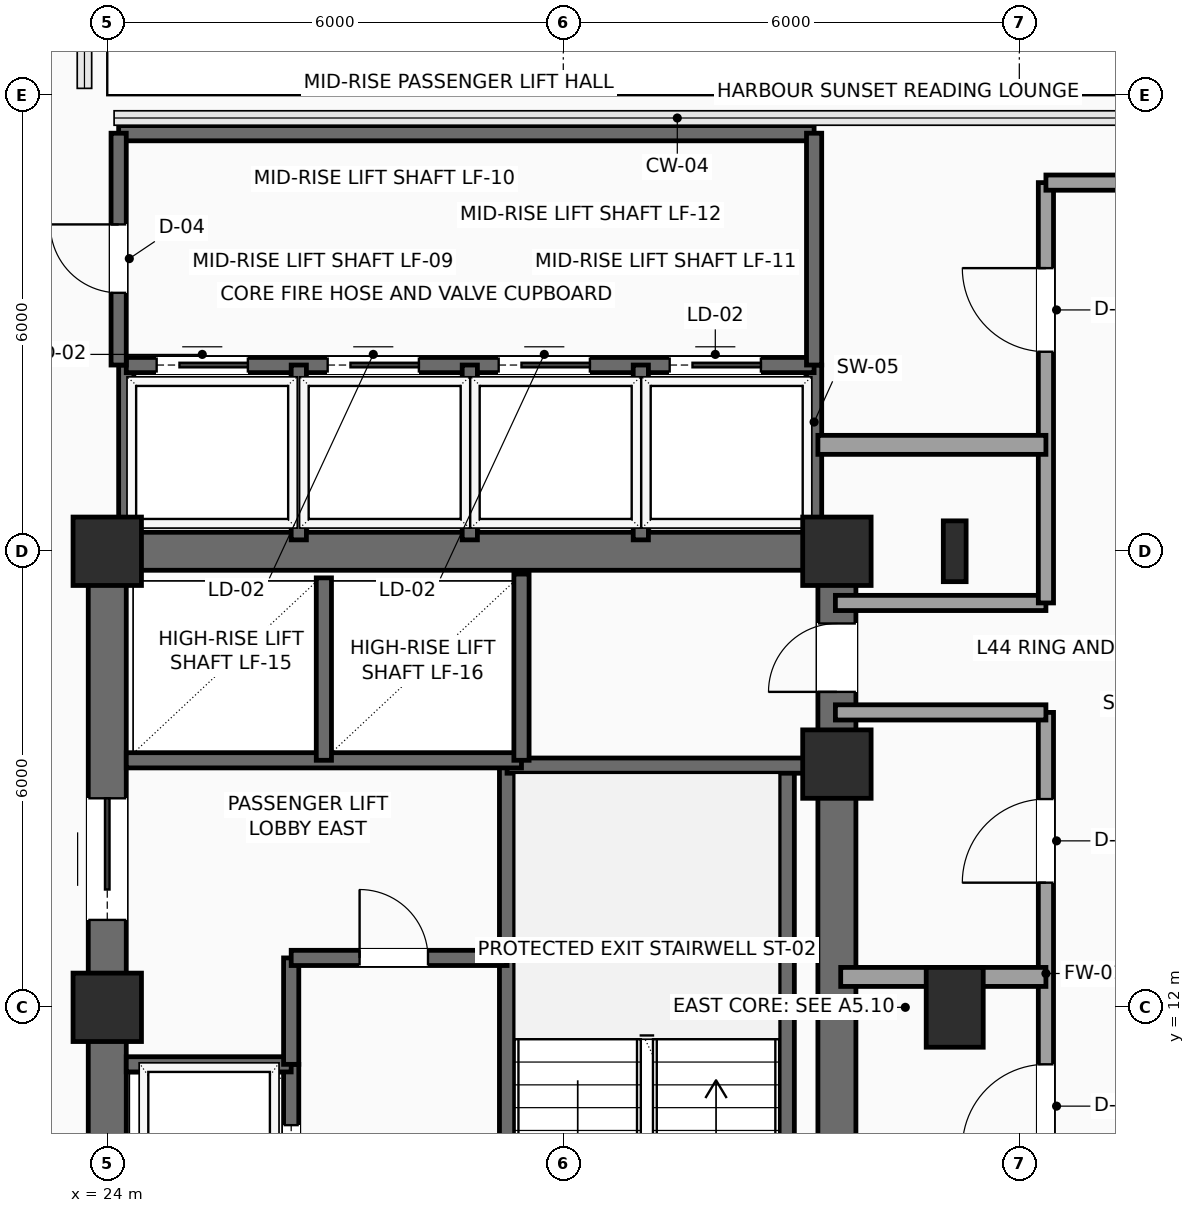
"""IFC4 building model, lengths in metres.
Left out: names, types, materials, properties, quantities, classifications, styles, units other than length and angle.
Written with IfcOpenShell. Run it as: python <this file> out.ifc"""

import sys

from ifc_helpers import new_model, si_unit, direction, frame, frame_2d, origin, origin_2d, place, context, subcontext, project, spatial, rectangle, i_section, extrude, element, fill, save


model = new_model("IFC4")
c1 = context("Model", 3, precision=1e-05, world=origin(), true_north=direction((0.0, 1.0)))
c2 = subcontext(c1, "Body", "Model", "MODEL_VIEW")
j1 = project(units=[si_unit("LENGTHUNIT", "METRE"), si_unit("PLANEANGLEUNIT", "RADIAN")], contexts=[c1])
p1 = place(None, origin())
s1 = spatial("IfcSite", under=j1, at=p1, CompositionType="ELEMENT")
p2 = place(p1, origin())
s2 = spatial("IfcBuilding", under=s1, at=p2, CompositionType="ELEMENT")
p3 = place(p2, frame((0.0, 0.0, 180.45)))
s3 = spatial("IfcBuildingStorey", under=s2, at=p3, CompositionType="ELEMENT", Elevation=180.45)
for number, where, z_axis, x_axis in (
    (1, (24.0, 12.0, 0.0), (0.0, 0.0, 1.0), (1.0, 0.0, 0.0)),
    (2, (24.0, 18.0, 0.0), (0.0, 0.0, 1.0), (1.0, 0.0, 0.0)),
    (3, (33.6, 15.2, 0.0), (0.0, 0.0, 1.0), (1.0, 0.0, 0.0)),
    (4, (33.6, 18.0, 0.0), (0.0, 0.0, 1.0), (1.0, 0.0, 0.0)),
):
    element("IfcColumn", number, at=place(p3, frame(where, z_axis=z_axis, x_axis=x_axis)), inside=s3, PredefinedType="COLUMN", context=c2, shape_type="SweptSolid", body=[
        extrude(rectangle(XDim=0.9, YDim=0.9, at=origin_2d()), origin(), (0.0, 0.0, 1.0), 3.75),
    ])
p4 = place(p3, frame((35.15, 12.0, 0.0), z_axis=(0.0, 0.0, 1.0), x_axis=(1.0, 0.0, 0.0)))
e5 = element("IfcColumn", 5, at=p4, inside=s3, PredefinedType="COLUMN", context=c2, shape_type="SweptSolid", body=[
    extrude(rectangle(XDim=0.75, YDim=1.05, at=origin_2d()), origin(), (0.0, 0.0, 1.0), 3.75),
])
p5 = place(p3, frame((35.15, 18.0, 0.0), z_axis=(0.0, 0.0, 1.0), x_axis=(1.0, 0.0, 0.0)))
e6 = element("IfcColumn", 6, at=p5, inside=s3, PredefinedType="COLUMN", context=c2, shape_type="SweptSolid", body=[
    extrude(i_section(OverallWidth=0.3, OverallDepth=0.8, WebThickness=0.018, FlangeThickness=0.033, FilletRadius=0.03, at=origin_2d()), origin(), (0.0, 0.0, 1.0), 3.75),
])
p6 = place(p3, frame((24.0, 18.0, 0.0), z_axis=(0.0, 0.0, 1.0), x_axis=(1.0, 0.0, 0.0)))
e7 = element("IfcWall", 7, at=p6, inside=s3, PredefinedType="SHEAR", context=c2, shape_type="SweptSolid", body=[
    extrude(rectangle(XDim=9.6, YDim=0.5, at=frame_2d((4.8, 0.0))), origin(), (0.0, 0.0, 1.0), 3.54),
])
p7 = place(p3, frame((24.0, 6.0, 0.0), z_axis=(0.0, 0.0, 1.0), x_axis=(0.0, 1.0, 0.0)))
e8 = element("IfcWall", 8, at=p7, inside=s3, PredefinedType="SHEAR", context=c2, shape_type="SweptSolid", body=[
    extrude(rectangle(XDim=12.0, YDim=0.5, at=frame_2d((6.0, 0.0))), origin(), (0.0, 0.0, 1.0), 3.54),
])
p8 = place(p7, frame((7.15, 0.0, 0.0)))
e9 = element("IfcOpeningElement", 9, at=p8, cuts=e8, PredefinedType="OPENING", context=c2, shape_type="SweptSolid", body=[
    extrude(rectangle(XDim=1.6, YDim=2.3, at=frame_2d((0.8, 1.15))), frame((0.0, 0.26, 0.0), z_axis=(0.0, -1.0, 0.0), x_axis=(1.0, 0.0, 0.0)), (0.0, 0.0, 1.0), 0.52),
])
p9 = place(p3, frame((33.6, 6.0, 0.0), z_axis=(0.0, 0.0, 1.0), x_axis=(0.0, 1.0, 0.0)))
e10 = element("IfcWall", 10, at=p9, inside=s3, PredefinedType="SHEAR", context=c2, shape_type="SweptSolid", body=[
    extrude(rectangle(XDim=12.0, YDim=0.5, at=frame_2d((6.0, 0.0))), origin(), (0.0, 0.0, 1.0), 3.54),
])
p10 = place(p9, frame((10.15, 0.0, 0.0)))
e11 = element("IfcOpeningElement", 11, at=p10, cuts=e10, PredefinedType="OPENING", context=c2, shape_type="SweptSolid", body=[
    extrude(rectangle(XDim=0.9, YDim=2.15, at=frame_2d((0.45, 1.075))), frame((0.0, 0.26, 0.0), z_axis=(0.0, -1.0, 0.0), x_axis=(1.0, 0.0, 0.0)), (0.0, 0.0, 1.0), 0.52),
])
p11 = place(p3, frame((29.26, 6.3, 0.0), z_axis=(0.0, 0.0, 1.0), x_axis=(0.0, 1.0, 0.0)))
e12 = element("IfcWall", 12, at=p11, inside=s3, PredefinedType="SHEAR", context=c2, shape_type="SweptSolid", body=[
    extrude(rectangle(XDim=8.88, YDim=0.2, at=frame_2d((4.44, 0.0))), origin(), (0.0, 0.0, 1.0), 3.54),
])
p12 = place(p11, frame((0.35, 0.0, 0.0)))
e13 = element("IfcOpeningElement", 13, at=p12, cuts=e12, PredefinedType="OPENING", context=c2, shape_type="SweptSolid", body=[
    extrude(rectangle(XDim=1.1, YDim=2.2, at=frame_2d((0.55, 1.1))), frame((0.0, 0.11, 0.0), z_axis=(0.0, -1.0, 0.0), x_axis=(1.0, 0.0, 0.0)), (0.0, 0.0, 1.0), 0.22),
])
p13 = place(p3, frame((32.94, 6.3, 0.0), z_axis=(0.0, 0.0, 1.0), x_axis=(0.0, 1.0, 0.0)))
e14 = element("IfcWall", 14, at=p13, inside=s3, PredefinedType="SHEAR", context=c2, shape_type="SweptSolid", body=[
    extrude(rectangle(XDim=8.88, YDim=0.2, at=frame_2d((4.44, 0.0))), origin(), (0.0, 0.0, 1.0), 3.54),
])
p14 = place(p3, frame((29.26, 15.18, 0.0), z_axis=(0.0, 0.0, 1.0), x_axis=(1.0, 0.0, 0.0)))
e15 = element("IfcWall", 15, at=p14, inside=s3, PredefinedType="SHEAR", context=c2, shape_type="SweptSolid", body=[
    extrude(rectangle(XDim=4.04, YDim=0.2, at=frame_2d((2.02, 0.0))), origin(), (0.0, 0.0, 1.0), 3.54),
])
p15 = place(p3, frame((26.42, 6.3, 0.0), z_axis=(0.0, 0.0, 1.0), x_axis=(0.0, 1.0, 0.0)))
e16 = element("IfcWall", 16, at=p15, inside=s3, PredefinedType="SHEAR", context=c2, shape_type="SweptSolid", body=[
    extrude(rectangle(XDim=4.95, YDim=0.2, at=frame_2d((2.475, 0.0))), origin(), (0.0, 0.0, 1.0), 3.54),
])
p16 = place(p15, frame((0.65, 0.0, 0.0)))
e17 = element("IfcOpeningElement", 17, at=p16, cuts=e16, PredefinedType="OPENING", context=c2, shape_type="SweptSolid", body=[
    extrude(rectangle(XDim=1.1, YDim=2.2, at=frame_2d((0.55, 1.1))), frame((0.0, 0.11, 0.0), z_axis=(0.0, -1.0, 0.0), x_axis=(1.0, 0.0, 0.0)), (0.0, 0.0, 1.0), 0.22),
])
p17 = place(p15, frame((3.05, 0.0, 0.0)))
e18 = element("IfcOpeningElement", 18, at=p17, cuts=e16, PredefinedType="OPENING", context=c2, shape_type="SweptSolid", body=[
    extrude(rectangle(XDim=1.1, YDim=2.2, at=frame_2d((0.55, 1.1))), frame((0.0, 0.11, 0.0), z_axis=(0.0, -1.0, 0.0), x_axis=(1.0, 0.0, 0.0)), (0.0, 0.0, 1.0), 0.22),
])
p18 = place(p3, frame((24.25, 11.25, 0.0), z_axis=(0.0, 0.0, 1.0), x_axis=(1.0, 0.0, 0.0)))
e19 = element("IfcWall", 19, at=p18, inside=s3, PredefinedType="SHEAR", context=c2, shape_type="SweptSolid", body=[
    extrude(rectangle(XDim=2.17, YDim=0.2, at=frame_2d((1.085, 0.0))), origin(), (0.0, 0.0, 1.0), 3.54),
])
p19 = place(p3, frame((26.42, 11.25, 0.0), z_axis=(0.0, 0.0, 1.0), x_axis=(0.0, 1.0, 0.0)))
e20 = element("IfcWall", 20, at=p19, inside=s3, PredefinedType="SHEAR", context=c2, shape_type="SweptSolid", body=[
    extrude(rectangle(XDim=1.4, YDim=0.2, at=frame_2d((0.7, 0.0))), origin(), (0.0, 0.0, 1.0), 3.54),
])
p20 = place(p3, frame((26.42, 12.65, 0.0), z_axis=(0.0, 0.0, 1.0), x_axis=(1.0, 0.0, 0.0)))
e21 = element("IfcWall", 21, at=p20, inside=s3, PredefinedType="SHEAR", context=c2, shape_type="SweptSolid", body=[
    extrude(rectangle(XDim=2.84, YDim=0.2, at=frame_2d((1.42, 0.0))), origin(), (0.0, 0.0, 1.0), 3.54),
])
p21 = place(p20, frame((0.9, 0.0, 0.0)))
e22 = element("IfcOpeningElement", 22, at=p21, cuts=e21, PredefinedType="OPENING", context=c2, shape_type="SweptSolid", body=[
    extrude(rectangle(XDim=0.9, YDim=2.15, at=frame_2d((0.45, 1.075))), frame((0.0, 0.11, 0.0), z_axis=(0.0, -1.0, 0.0), x_axis=(1.0, 0.0, 0.0)), (0.0, 0.0, 1.0), 0.22),
])
p22 = place(p3, frame((24.25, 15.25, 0.0), z_axis=(0.0, 0.0, 1.0), x_axis=(1.0, 0.0, 0.0)))
e23 = element("IfcWall", 23, at=p22, inside=s3, PredefinedType="SHEAR", context=c2, shape_type="SweptSolid", body=[
    extrude(rectangle(XDim=5.2, YDim=0.2, at=frame_2d((2.6, 0.0))), origin(), (0.0, 0.0, 1.0), 3.54),
])
p23 = place(p3, frame((26.85, 15.25, 0.0), z_axis=(0.0, 0.0, 1.0), x_axis=(0.0, 1.0, 0.0)))
e24 = element("IfcWall", 24, at=p23, inside=s3, PredefinedType="SHEAR", context=c2, shape_type="SweptSolid", body=[
    extrude(rectangle(XDim=2.4, YDim=0.2, at=frame_2d((1.2, 0.0))), origin(), (0.0, 0.0, 1.0), 3.54),
])
p24 = place(p3, frame((29.45, 15.25, 0.0), z_axis=(0.0, 0.0, 1.0), x_axis=(0.0, 1.0, 0.0)))
e25 = element("IfcWall", 25, at=p24, inside=s3, PredefinedType="SHEAR", context=c2, shape_type="SweptSolid", body=[
    extrude(rectangle(XDim=2.45, YDim=0.2, at=frame_2d((1.225, 0.0))), origin(), (0.0, 0.0, 1.0), 3.54),
])
for number, where, z_axis, x_axis in (
    (26, (33.3, 18.1, 0.0), (0.0, 0.0, 1.0), (0.0, 1.0, 0.0)),
    (27, (24.25, 18.1, 0.0), (0.0, 0.0, 1.0), (0.0, 1.0, 0.0)),
):
    element("IfcWall", number, at=place(p3, frame(where, z_axis=z_axis, x_axis=x_axis)), inside=s3, PredefinedType="SHEAR", context=c2, shape_type="SweptSolid", body=[
        extrude(rectangle(XDim=2.35, YDim=0.2, at=frame_2d((1.175, 0.0))), origin(), (0.0, 0.0, 1.0), 3.54),
    ])
p25 = place(p3, frame((24.25, 20.45, 0.0), z_axis=(0.0, 0.0, 1.0), x_axis=(1.0, 0.0, 0.0)))
e28 = element("IfcWall", 28, at=p25, inside=s3, PredefinedType="SHEAR", context=c2, shape_type="SweptSolid", body=[
    extrude(rectangle(XDim=9.05, YDim=0.2, at=frame_2d((4.525, 0.0))), origin(), (0.0, 0.0, 1.0), 3.54),
])
p26 = place(p25, frame((0.4, 0.0, 0.0)))
e29 = element("IfcOpeningElement", 29, at=p26, cuts=e28, PredefinedType="OPENING", context=c2, shape_type="SweptSolid", body=[
    extrude(rectangle(XDim=1.2, YDim=2.2, at=frame_2d((0.6, 1.1))), frame((0.0, 0.11, 0.0), z_axis=(0.0, -1.0, 0.0), x_axis=(1.0, 0.0, 0.0)), (0.0, 0.0, 1.0), 0.22),
])
p27 = place(p25, frame((2.65, 0.0, 0.0)))
e30 = element("IfcOpeningElement", 30, at=p27, cuts=e28, PredefinedType="OPENING", context=c2, shape_type="SweptSolid", body=[
    extrude(rectangle(XDim=1.2, YDim=2.2, at=frame_2d((0.6, 1.1))), frame((0.0, 0.11, 0.0), z_axis=(0.0, -1.0, 0.0), x_axis=(1.0, 0.0, 0.0)), (0.0, 0.0, 1.0), 0.22),
])
p28 = place(p25, frame((4.9, 0.0, 0.0)))
e31 = element("IfcOpeningElement", 31, at=p28, cuts=e28, PredefinedType="OPENING", context=c2, shape_type="SweptSolid", body=[
    extrude(rectangle(XDim=1.2, YDim=2.2, at=frame_2d((0.6, 1.1))), frame((0.0, 0.11, 0.0), z_axis=(0.0, -1.0, 0.0), x_axis=(1.0, 0.0, 0.0)), (0.0, 0.0, 1.0), 0.22),
])
p29 = place(p25, frame((7.15, 0.0, 0.0)))
e32 = element("IfcOpeningElement", 32, at=p29, cuts=e28, PredefinedType="OPENING", context=c2, shape_type="SweptSolid", body=[
    extrude(rectangle(XDim=1.2, YDim=2.2, at=frame_2d((0.6, 1.1))), frame((0.0, 0.11, 0.0), z_axis=(0.0, -1.0, 0.0), x_axis=(1.0, 0.0, 0.0)), (0.0, 0.0, 1.0), 0.22),
])
for number, where, z_axis, x_axis in (
    (33, (26.52, 18.15, 0.0), (0.0, 0.0, 1.0), (0.0, 1.0, 0.0)),
    (34, (28.77, 18.15, 0.0), (0.0, 0.0, 1.0), (0.0, 1.0, 0.0)),
    (35, (31.02, 18.15, 0.0), (0.0, 0.0, 1.0), (0.0, 1.0, 0.0)),
):
    element("IfcWall", number, at=place(p3, frame(where, z_axis=z_axis, x_axis=x_axis)), inside=s3, PredefinedType="SHEAR", context=c2, shape_type="SweptSolid", body=[
        extrude(rectangle(XDim=2.3, YDim=0.2, at=frame_2d((1.15, 0.0))), origin(), (0.0, 0.0, 1.0), 3.54),
    ])
p30 = place(p3, frame((24.15, 23.5, 0.0), z_axis=(0.0, 0.0, 1.0), x_axis=(1.0, 0.0, 0.0)))
e36 = element("IfcWall", 36, at=p30, inside=s3, PredefinedType="SHEAR", context=c2, shape_type="SweptSolid", body=[
    extrude(rectangle(XDim=9.15, YDim=0.2, at=frame_2d((4.575, 0.0))), origin(), (0.0, 0.0, 1.0), 3.54),
])
p31 = place(p3, frame((33.3, 20.45, 0.0), z_axis=(0.0, 0.0, 1.0), x_axis=(0.0, 1.0, 0.0)))
e37 = element("IfcWall", 37, at=p31, inside=s3, PredefinedType="SHEAR", context=c2, shape_type="SweptSolid", body=[
    extrude(rectangle(XDim=3.05, YDim=0.2, at=frame_2d((1.525, 0.0))), origin(), (0.0, 0.0, 1.0), 3.54),
])
p32 = place(p3, frame((24.15, 20.45, 0.0), z_axis=(0.0, 0.0, 1.0), x_axis=(0.0, 1.0, 0.0)))
e38 = element("IfcWall", 38, at=p32, inside=s3, PredefinedType="SHEAR", context=c2, shape_type="SweptSolid", body=[
    extrude(rectangle(XDim=3.05, YDim=0.2, at=frame_2d((1.525, 0.0))), origin(), (0.0, 0.0, 1.0), 3.54),
])
p33 = place(p32, frame((0.95, 0.0, 0.0)))
e39 = element("IfcOpeningElement", 39, at=p33, cuts=e38, PredefinedType="OPENING", context=c2, shape_type="SweptSolid", body=[
    extrude(rectangle(XDim=0.9, YDim=2.15, at=frame_2d((0.45, 1.075))), frame((0.0, 0.11, 0.0), z_axis=(0.0, -1.0, 0.0), x_axis=(1.0, 0.0, 0.0)), (0.0, 0.0, 1.0), 0.22),
])
p34 = place(p3, frame((36.35, 5.8, 0.0), z_axis=(0.0, 0.0, 1.0), x_axis=(0.0, 1.0, 0.0)))
e40 = element("IfcWall", 40, at=p34, inside=s3, PredefinedType="SOLIDWALL", context=c2, shape_type="SweptSolid", body=[
    extrude(rectangle(XDim=10.08, YDim=0.2, at=frame_2d((5.04, 0.0))), origin(), (0.0, 0.0, 1.0), 3.54),
])
p35 = place(p34, frame((1.05, 0.0, 0.0)))
e41 = element("IfcOpeningElement", 41, at=p35, cuts=e40, PredefinedType="OPENING", context=c2, shape_type="SweptSolid", body=[
    extrude(rectangle(XDim=1.1, YDim=2.25, at=frame_2d((0.55, 1.125))), frame((0.0, 0.11, 0.0), z_axis=(0.0, -1.0, 0.0), x_axis=(1.0, 0.0, 0.0)), (0.0, 0.0, 1.0), 0.22),
])
p36 = place(p34, frame((4.35, 0.0, 0.0)))
e42 = element("IfcOpeningElement", 42, at=p36, cuts=e40, PredefinedType="OPENING", context=c2, shape_type="SweptSolid", body=[
    extrude(rectangle(XDim=1.1, YDim=2.25, at=frame_2d((0.55, 1.125))), frame((0.0, 0.11, 0.0), z_axis=(0.0, -1.0, 0.0), x_axis=(1.0, 0.0, 0.0)), (0.0, 0.0, 1.0), 0.22),
])
p37 = place(p34, frame((7.84, 0.0, 0.0)))
e43 = element("IfcOpeningElement", 43, at=p37, cuts=e40, PredefinedType="OPENING", context=c2, shape_type="SweptSolid", body=[
    extrude(rectangle(XDim=1.1, YDim=2.25, at=frame_2d((0.55, 1.125))), frame((0.0, 0.11, 0.0), z_axis=(0.0, -1.0, 0.0), x_axis=(1.0, 0.0, 0.0)), (0.0, 0.0, 1.0), 0.22),
])
for number, where, z_axis, x_axis in (
    (44, (36.35, 15.88, 0.0), (0.0, 0.0, 1.0), (-1.0, 0.0, 0.0)),
    (45, (33.58, 17.32, 0.0), (0.0, 0.0, 1.0), (1.0, 0.0, 0.0)),
):
    element("IfcWall", number, at=place(p3, frame(where, z_axis=z_axis, x_axis=x_axis)), inside=s3, PredefinedType="SOLIDWALL", context=c2, shape_type="SweptSolid", body=[
        extrude(rectangle(XDim=2.77, YDim=0.2, at=frame_2d((1.385, 0.0))), origin(), (0.0, 0.0, 1.0), 3.54),
    ])
p38 = place(p3, frame((36.35, 17.32, 0.0), z_axis=(0.0, 0.0, 1.0), x_axis=(0.0, 1.0, 0.0)))
e46 = element("IfcWall", 46, at=p38, inside=s3, PredefinedType="SOLIDWALL", context=c2, shape_type="SweptSolid", body=[
    extrude(rectangle(XDim=5.53, YDim=0.2, at=frame_2d((2.765, 0.0))), origin(), (0.0, 0.0, 1.0), 3.54),
])
p39 = place(p38, frame((3.305, 0.0, 0.0)))
e47 = element("IfcOpeningElement", 47, at=p39, cuts=e46, PredefinedType="OPENING", context=c2, shape_type="SweptSolid", body=[
    extrude(rectangle(XDim=1.1, YDim=2.25, at=frame_2d((0.55, 1.125))), frame((0.0, 0.11, 0.0), z_axis=(0.0, -1.0, 0.0), x_axis=(1.0, 0.0, 0.0)), (0.0, 0.0, 1.0), 0.22),
])
p40 = place(p3, frame((36.35, 22.85, 0.0), z_axis=(0.0, 0.0, 1.0), x_axis=(1.0, 0.0, 0.0)))
e48 = element("IfcWall", 48, at=p40, inside=s3, PredefinedType="SOLIDWALL", context=c2, shape_type="SweptSolid", body=[
    extrude(rectangle(XDim=2.1, YDim=0.2, at=frame_2d((1.05, 0.0))), origin(), (0.0, 0.0, 1.0), 3.54),
])
p41 = place(p3, frame((33.65, 12.4, 0.0), z_axis=(0.0, 0.0, 1.0), x_axis=(1.0, 0.0, 0.0)))
e49 = element("IfcWall", 49, at=p41, inside=s3, PredefinedType="PARTITIONING", context=c2, shape_type="SweptSolid", body=[
    extrude(rectangle(XDim=2.7, YDim=0.25, at=frame_2d((1.35, 0.0))), origin(), (0.0, 0.0, 1.0), 3.54),
])
p42 = place(p3, frame((33.35, 19.4, 0.0), z_axis=(0.0, 0.0, 1.0), x_axis=(1.0, 0.0, 0.0)))
e50 = element("IfcWall", 50, at=p42, inside=s3, PredefinedType="PARTITIONING", context=c2, shape_type="SweptSolid", body=[
    extrude(rectangle(XDim=3.0, YDim=0.25, at=frame_2d((1.5, 0.0))), origin(), (0.0, 0.0, 1.0), 3.54),
])
p43 = place(p8, origin())
e51 = element("IfcDoor", 51, at=p43, inside=s3, OperationType="DOUBLE_DOOR_SLIDING", PredefinedType="DOOR", context=c2, shape_type="SweptSolid", body=[
    extrude(rectangle(XDim=1.6, YDim=2.3, at=frame_2d((0.8, 1.15))), frame((0.0, 0.025, 0.0), z_axis=(0.0, -1.0, 0.0), x_axis=(1.0, 0.0, 0.0)), (0.0, 0.0, 1.0), 0.05),
])
fill(e9, e51)
p44 = place(p10, origin())
e52 = element("IfcDoor", 52, at=p44, inside=s3, OperationType="SINGLE_SWING_LEFT", PredefinedType="DOOR", context=c2, shape_type="SweptSolid", body=[
    extrude(rectangle(XDim=0.9, YDim=2.15, at=frame_2d((0.45, 1.075))), frame((0.0, 0.025, 0.0), z_axis=(0.0, -1.0, 0.0), x_axis=(1.0, 0.0, 0.0)), (0.0, 0.0, 1.0), 0.05),
])
fill(e11, e52)
p45 = place(p17, origin())
e53 = element("IfcDoor", 53, at=p45, inside=s3, OperationType="SLIDING_TO_LEFT", PredefinedType="DOOR", context=c2, shape_type="SweptSolid", body=[
    extrude(rectangle(XDim=1.1, YDim=2.2, at=frame_2d((0.55, 1.1))), frame((0.0, 0.025, 0.0), z_axis=(0.0, -1.0, 0.0), x_axis=(1.0, 0.0, 0.0)), (0.0, 0.0, 1.0), 0.05),
])
fill(e18, e53)
p46 = place(p21, origin())
e54 = element("IfcDoor", 54, at=p46, inside=s3, OperationType="SINGLE_SWING_LEFT", PredefinedType="DOOR", context=c2, shape_type="SweptSolid", body=[
    extrude(rectangle(XDim=0.9, YDim=2.15, at=frame_2d((0.45, 1.075))), frame((0.0, 0.025, 0.0), z_axis=(0.0, -1.0, 0.0), x_axis=(1.0, 0.0, 0.0)), (0.0, 0.0, 1.0), 0.05),
])
fill(e22, e54)
p47 = place(p26, origin())
e55 = element("IfcDoor", 55, at=p47, inside=s3, OperationType="SLIDING_TO_RIGHT", PredefinedType="DOOR", context=c2, shape_type="SweptSolid", body=[
    extrude(rectangle(XDim=1.2, YDim=2.2, at=frame_2d((0.6, 1.1))), frame((0.0, 0.025, 0.0), z_axis=(0.0, -1.0, 0.0), x_axis=(1.0, 0.0, 0.0)), (0.0, 0.0, 1.0), 0.05),
])
fill(e29, e55)
p48 = place(p27, origin())
e56 = element("IfcDoor", 56, at=p48, inside=s3, OperationType="SLIDING_TO_RIGHT", PredefinedType="DOOR", context=c2, shape_type="SweptSolid", body=[
    extrude(rectangle(XDim=1.2, YDim=2.2, at=frame_2d((0.6, 1.1))), frame((0.0, 0.025, 0.0), z_axis=(0.0, -1.0, 0.0), x_axis=(1.0, 0.0, 0.0)), (0.0, 0.0, 1.0), 0.05),
])
fill(e30, e56)
p49 = place(p28, origin())
e57 = element("IfcDoor", 57, at=p49, inside=s3, OperationType="SLIDING_TO_RIGHT", PredefinedType="DOOR", context=c2, shape_type="SweptSolid", body=[
    extrude(rectangle(XDim=1.2, YDim=2.2, at=frame_2d((0.6, 1.1))), frame((0.0, 0.025, 0.0), z_axis=(0.0, -1.0, 0.0), x_axis=(1.0, 0.0, 0.0)), (0.0, 0.0, 1.0), 0.05),
])
fill(e31, e57)
p50 = place(p29, origin())
e58 = element("IfcDoor", 58, at=p50, inside=s3, OperationType="SLIDING_TO_RIGHT", PredefinedType="DOOR", context=c2, shape_type="SweptSolid", body=[
    extrude(rectangle(XDim=1.2, YDim=2.2, at=frame_2d((0.6, 1.1))), frame((0.0, 0.025, 0.0), z_axis=(0.0, -1.0, 0.0), x_axis=(1.0, 0.0, 0.0)), (0.0, 0.0, 1.0), 0.05),
])
fill(e32, e58)
p51 = place(p33, origin())
e59 = element("IfcDoor", 59, at=p51, inside=s3, OperationType="SINGLE_SWING_RIGHT", PredefinedType="DOOR", context=c2, shape_type="SweptSolid", body=[
    extrude(rectangle(XDim=0.9, YDim=2.15, at=frame_2d((0.45, 1.075))), frame((0.0, 0.025, 0.0), z_axis=(0.0, -1.0, 0.0), x_axis=(1.0, 0.0, 0.0)), (0.0, 0.0, 1.0), 0.05),
])
fill(e39, e59)
p52 = place(p36, origin())
e60 = element("IfcDoor", 60, at=p52, inside=s3, OperationType="SINGLE_SWING_LEFT", PredefinedType="DOOR", context=c2, shape_type="SweptSolid", body=[
    extrude(rectangle(XDim=1.1, YDim=2.25, at=frame_2d((0.55, 1.125))), frame((0.0, 0.025, 0.0), z_axis=(0.0, -1.0, 0.0), x_axis=(1.0, 0.0, 0.0)), (0.0, 0.0, 1.0), 0.05),
])
fill(e42, e60)
p53 = place(p37, origin())
e61 = element("IfcDoor", 61, at=p53, inside=s3, OperationType="SINGLE_SWING_LEFT", PredefinedType="DOOR", context=c2, shape_type="SweptSolid", body=[
    extrude(rectangle(XDim=1.1, YDim=2.25, at=frame_2d((0.55, 1.125))), frame((0.0, 0.025, 0.0), z_axis=(0.0, -1.0, 0.0), x_axis=(1.0, 0.0, 0.0)), (0.0, 0.0, 1.0), 0.05),
])
fill(e43, e61)
p54 = place(p39, origin())
e62 = element("IfcDoor", 62, at=p54, inside=s3, OperationType="SINGLE_SWING_RIGHT", PredefinedType="DOOR", context=c2, shape_type="SweptSolid", body=[
    extrude(rectangle(XDim=1.1, YDim=2.25, at=frame_2d((0.55, 1.125))), frame((0.0, 0.025, 0.0), z_axis=(0.0, -1.0, 0.0), x_axis=(1.0, 0.0, 0.0)), (0.0, 0.0, 1.0), 0.05),
])
fill(e47, e62)
save(model, sys.argv[1])
